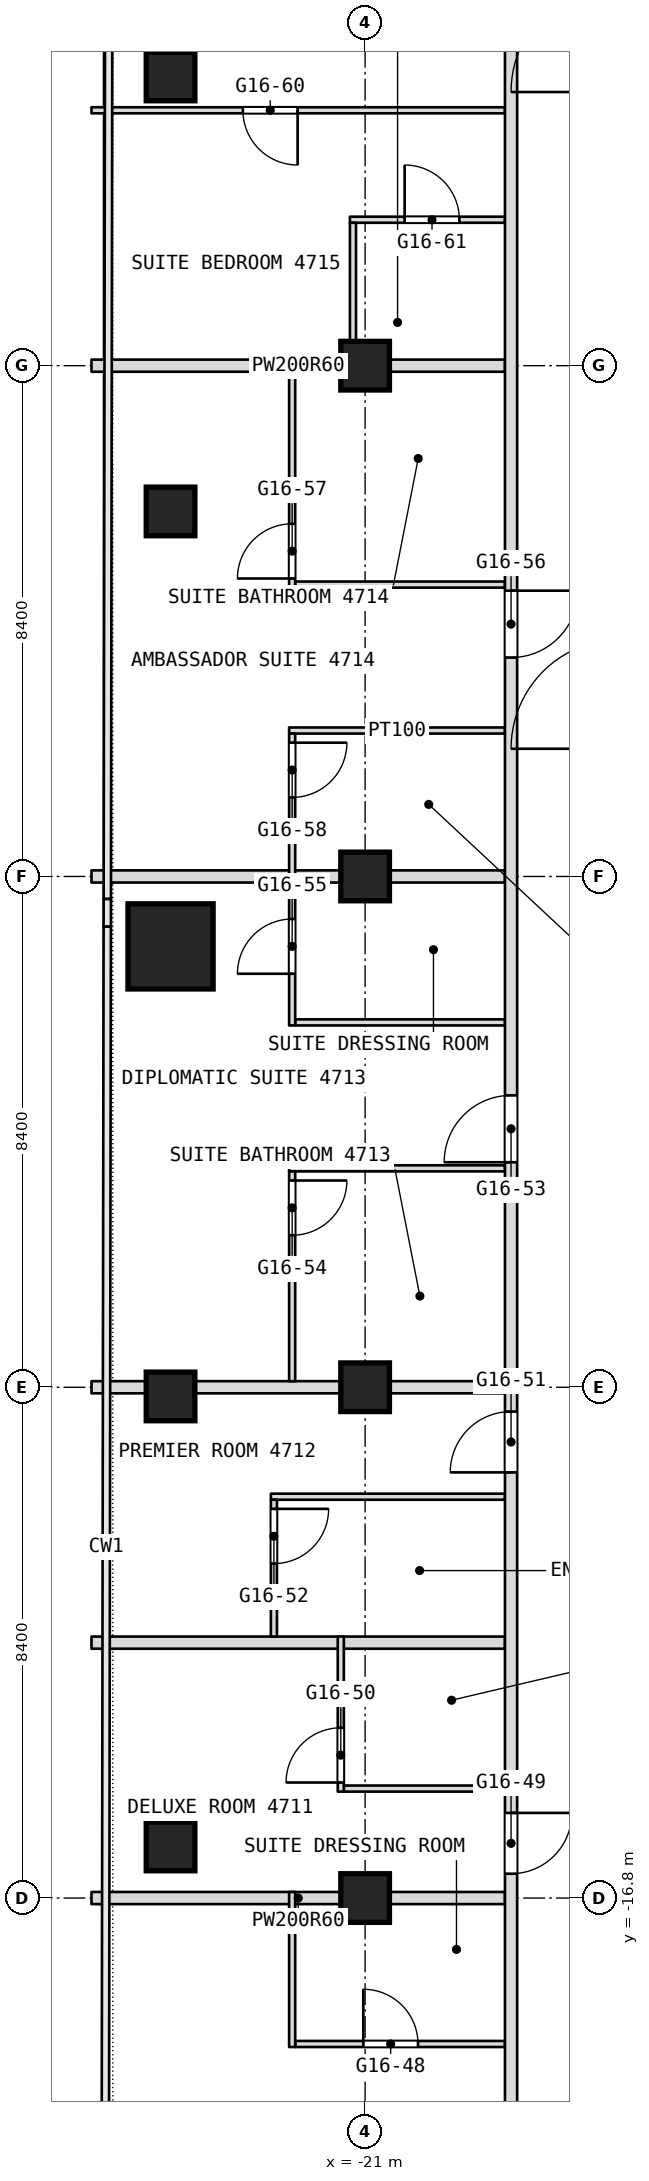
"""IFC4 building model, lengths in metres.
Left out: names, types, materials, properties, quantities, classifications, styles, units other than length and angle.
Written with IfcOpenShell. Run it as: python <this file> out.ifc"""

import sys

from ifc_helpers import new_model, si_unit, direction, frame, frame_2d, origin, origin_2d, place, context, subcontext, project, spatial, rectangle, extrude, element, fill, save


model = new_model("IFC4")
c1 = context("Model", 3, precision=1e-05, world=origin(), true_north=direction((0.0, 1.0)))
c2 = subcontext(c1, "Body", "Model", "MODEL_VIEW")
j1 = project(units=[si_unit("LENGTHUNIT", "METRE"), si_unit("PLANEANGLEUNIT", "RADIAN")], contexts=[c1])
p1 = place(None, origin())
s1 = spatial("IfcSite", under=j1, at=p1, CompositionType="ELEMENT")
p2 = place(p1, origin())
s2 = spatial("IfcBuilding", under=s1, at=p2, CompositionType="ELEMENT")
p3 = place(p2, frame((0.0, 0.0, 205.7)))
s3 = spatial("IfcBuildingStorey", under=s2, at=p3, CompositionType="ELEMENT", Elevation=205.7)
p4 = place(p3, frame((-24.2, -1.15, 0.0), z_axis=(0.0, 0.0, 1.0), x_axis=(1.0, 0.0, 0.0)))
e1 = element("IfcColumn", 1, at=p4, inside=s3, PredefinedType="COLUMN", context=c2, shape_type="SweptSolid", body=[
    extrude(rectangle(XDim=1.4, YDim=1.4, at=origin_2d()), origin(), (0.0, 0.0, 1.0), 3.6),
])
for number, where, z_axis, x_axis in (
    (2, (-21.0, -16.8, 0.0), (0.0, 0.0, 1.0), (1.0, 0.0, 0.0)),
    (3, (-21.0, -8.4, 0.0), (0.0, 0.0, 1.0), (1.0, 0.0, 0.0)),
    (4, (-21.0, 0.0, 0.0), (0.0, 0.0, 1.0), (1.0, 0.0, 0.0)),
    (5, (-21.0, 8.4, 0.0), (0.0, 0.0, 1.0), (1.0, 0.0, 0.0)),
    (6, (-24.2, -15.952, 0.0), (0.0, 0.0, 1.0), (1.0, 0.0, 0.0)),
    (7, (-24.2, -8.551, 0.0), (0.0, 0.0, 1.0), (1.0, 0.0, 0.0)),
    (8, (-24.2, 6.003, 0.0), (0.0, 0.0, 1.0), (1.0, 0.0, 0.0)),
    (9, (-24.2, 13.156, 0.0), (0.0, 0.0, 1.0), (1.0, 0.0, 0.0)),
):
    element("IfcColumn", number, at=place(p3, frame(where, z_axis=z_axis, x_axis=x_axis)), inside=s3, PredefinedType="COLUMN", context=c2, shape_type="SweptSolid", body=[
        extrude(rectangle(XDim=0.8, YDim=0.8, at=origin_2d()), origin(), (0.0, 0.0, 1.0), 3.6),
    ])
p5 = place(p3, frame((-22.15, -19.2, 0.0), z_axis=(0.0, 0.0, 1.0), x_axis=(1.0, 0.0, 0.0)))
e10 = element("IfcWall", 10, at=p5, inside=s3, PredefinedType="PARTITIONING", context=c2, shape_type="SweptSolid", body=[
    extrude(rectangle(XDim=3.45, YDim=0.1, at=frame_2d((1.725, 0.0))), origin(), (0.0, 0.0, 1.0), 3.34),
])
p6 = place(p5, frame((1.12, 0.0, 0.0)))
e11 = element("IfcOpeningElement", 11, at=p6, cuts=e10, PredefinedType="OPENING", context=c2, shape_type="SweptSolid", body=[
    extrude(rectangle(XDim=0.9, YDim=2.1, at=frame_2d((0.45, 1.05))), frame((0.0, 0.05, 0.0), z_axis=(0.0, -1.0, 0.0), x_axis=(1.0, 0.0, 0.0)), (0.0, 0.0, 1.0), 0.1),
])
p7 = place(p3, frame((-25.5, -16.8, 0.0), z_axis=(0.0, 0.0, 1.0), x_axis=(1.0, 0.0, 0.0)))
e12 = element("IfcWall", 12, at=p7, inside=s3, PredefinedType="PARTITIONING", context=c2, shape_type="SweptSolid", body=[
    extrude(rectangle(XDim=6.8, YDim=0.2, at=frame_2d((3.4, 0.0))), origin(), (0.0, 0.0, 1.0), 2.94),
])
p8 = place(p3, frame((-21.35, -15.0, 0.0), z_axis=(0.0, 0.0, 1.0), x_axis=(1.0, 0.0, 0.0)))
e13 = element("IfcWall", 13, at=p8, inside=s3, PredefinedType="PARTITIONING", context=c2, shape_type="SweptSolid", body=[
    extrude(rectangle(XDim=2.65, YDim=0.1, at=frame_2d((1.325, 0.0))), origin(), (0.0, 0.0, 1.0), 3.34),
])
p9 = place(p3, frame((-25.5, -12.6, 0.0), z_axis=(0.0, 0.0, 1.0), x_axis=(1.0, 0.0, 0.0)))
e14 = element("IfcWall", 14, at=p9, inside=s3, PredefinedType="PARTITIONING", context=c2, shape_type="SweptSolid", body=[
    extrude(rectangle(XDim=6.8, YDim=0.2, at=frame_2d((3.4, 0.0))), origin(), (0.0, 0.0, 1.0), 3.34),
])
p10 = place(p3, frame((-22.55, -10.2, 0.0), z_axis=(0.0, 0.0, 1.0), x_axis=(1.0, 0.0, 0.0)))
e15 = element("IfcWall", 15, at=p10, inside=s3, PredefinedType="PARTITIONING", context=c2, shape_type="SweptSolid", body=[
    extrude(rectangle(XDim=3.85, YDim=0.1, at=frame_2d((1.925, 0.0))), origin(), (0.0, 0.0, 1.0), 3.34),
])
p11 = place(p3, frame((-25.5, -8.4, 0.0), z_axis=(0.0, 0.0, 1.0), x_axis=(1.0, 0.0, 0.0)))
e16 = element("IfcWall", 16, at=p11, inside=s3, PredefinedType="PARTITIONING", context=c2, shape_type="SweptSolid", body=[
    extrude(rectangle(XDim=6.8, YDim=0.2, at=frame_2d((3.4, 0.0))), origin(), (0.0, 0.0, 1.0), 2.94),
])
p12 = place(p3, frame((-22.25, -4.8, 0.0), z_axis=(0.0, 0.0, 1.0), x_axis=(1.0, 0.0, 0.0)))
e17 = element("IfcWall", 17, at=p12, inside=s3, PredefinedType="PARTITIONING", context=c2, shape_type="SweptSolid", body=[
    extrude(rectangle(XDim=3.55, YDim=0.1, at=frame_2d((1.775, 0.0))), origin(), (0.0, 0.0, 1.0), 3.34),
])
p13 = place(p3, frame((-22.15, -2.4, 0.0), z_axis=(0.0, 0.0, 1.0), x_axis=(1.0, 0.0, 0.0)))
e18 = element("IfcWall", 18, at=p13, inside=s3, PredefinedType="PARTITIONING", context=c2, shape_type="SweptSolid", body=[
    extrude(rectangle(XDim=3.45, YDim=0.1, at=frame_2d((1.725, 0.0))), origin(), (0.0, 0.0, 1.0), 3.34),
])
p14 = place(p3, frame((-25.5, 0.0, 0.0), z_axis=(0.0, 0.0, 1.0), x_axis=(1.0, 0.0, 0.0)))
e19 = element("IfcWall", 19, at=p14, inside=s3, PredefinedType="PARTITIONING", context=c2, shape_type="SweptSolid", body=[
    extrude(rectangle(XDim=6.8, YDim=0.2, at=frame_2d((3.4, 0.0))), origin(), (0.0, 0.0, 1.0), 2.94),
])
p15 = place(p3, frame((-22.25, 2.4, 0.0), z_axis=(0.0, 0.0, 1.0), x_axis=(1.0, 0.0, 0.0)))
e20 = element("IfcWall", 20, at=p15, inside=s3, PredefinedType="PARTITIONING", context=c2, shape_type="SweptSolid", body=[
    extrude(rectangle(XDim=3.55, YDim=0.1, at=frame_2d((1.775, 0.0))), origin(), (0.0, 0.0, 1.0), 3.34),
])
p16 = place(p3, frame((-22.15, 4.8, 0.0), z_axis=(0.0, 0.0, 1.0), x_axis=(1.0, 0.0, 0.0)))
e21 = element("IfcWall", 21, at=p16, inside=s3, PredefinedType="PARTITIONING", context=c2, shape_type="SweptSolid", body=[
    extrude(rectangle(XDim=3.45, YDim=0.1, at=frame_2d((1.725, 0.0))), origin(), (0.0, 0.0, 1.0), 3.34),
])
p17 = place(p3, frame((-25.5, 8.4, 0.0), z_axis=(0.0, 0.0, 1.0), x_axis=(1.0, 0.0, 0.0)))
e22 = element("IfcWall", 22, at=p17, inside=s3, PredefinedType="PARTITIONING", context=c2, shape_type="SweptSolid", body=[
    extrude(rectangle(XDim=6.8, YDim=0.2, at=frame_2d((3.4, 0.0))), origin(), (0.0, 0.0, 1.0), 2.94),
])
p18 = place(p3, frame((-21.25, 10.8, 0.0), z_axis=(0.0, 0.0, 1.0), x_axis=(1.0, 0.0, 0.0)))
e23 = element("IfcWall", 23, at=p18, inside=s3, PredefinedType="PARTITIONING", context=c2, shape_type="SweptSolid", body=[
    extrude(rectangle(XDim=2.55, YDim=0.1, at=frame_2d((1.275, 0.0))), origin(), (0.0, 0.0, 1.0), 3.34),
])
p19 = place(p18, frame((0.9, 0.0, 0.0)))
e24 = element("IfcOpeningElement", 24, at=p19, cuts=e23, PredefinedType="OPENING", context=c2, shape_type="SweptSolid", body=[
    extrude(rectangle(XDim=0.9, YDim=2.1, at=frame_2d((0.45, 1.05))), frame((0.0, 0.05, 0.0), z_axis=(0.0, -1.0, 0.0), x_axis=(1.0, 0.0, 0.0)), (0.0, 0.0, 1.0), 0.1),
])
p20 = place(p3, frame((-25.5, 12.6, 0.0), z_axis=(0.0, 0.0, 1.0), x_axis=(1.0, 0.0, 0.0)))
e25 = element("IfcWall", 25, at=p20, inside=s3, PredefinedType="PARTITIONING", context=c2, shape_type="SweptSolid", body=[
    extrude(rectangle(XDim=6.8, YDim=0.1, at=frame_2d((3.4, 0.0))), origin(), (0.0, 0.0, 1.0), 3.34),
])
p21 = place(p20, frame((2.49, 0.0, 0.0)))
e26 = element("IfcOpeningElement", 26, at=p21, cuts=e25, PredefinedType="OPENING", context=c2, shape_type="SweptSolid", body=[
    extrude(rectangle(XDim=0.9, YDim=2.1, at=frame_2d((0.45, 1.05))), frame((0.0, 0.05, 0.0), z_axis=(0.0, -1.0, 0.0), x_axis=(1.0, 0.0, 0.0)), (0.0, 0.0, 1.0), 0.1),
])
p22 = place(p3, frame((-18.6, -26.751, 0.0), z_axis=(0.0, 0.0, 1.0), x_axis=(0.0, 1.0, 0.0)))
e27 = element("IfcWall", 27, at=p22, inside=s3, PredefinedType="PARTITIONING", context=c2, shape_type="SweptSolid", body=[
    extrude(rectangle(XDim=49.091, YDim=0.2, at=frame_2d((24.545, 0.0))), origin(), (0.0, 0.0, 1.0), 3.34),
])
p23 = place(p22, frame((4.576, 0.0, 0.0)))
e28 = element("IfcOpeningElement", 28, at=p23, cuts=e27, PredefinedType="OPENING", context=c2, shape_type="SweptSolid", body=[
    extrude(rectangle(XDim=1.1, YDim=2.1, at=frame_2d((0.55, 1.05))), frame((0.0, 0.1, 0.0), z_axis=(0.0, -1.0, 0.0), x_axis=(1.0, 0.0, 0.0)), (0.0, 0.0, 1.0), 0.2),
])
p24 = place(p22, frame((10.351, 0.0, 0.0)))
e29 = element("IfcOpeningElement", 29, at=p24, cuts=e27, PredefinedType="OPENING", context=c2, shape_type="SweptSolid", body=[
    extrude(rectangle(XDim=1.0, YDim=2.1, at=frame_2d((0.5, 1.05))), frame((0.0, 0.1, 0.0), z_axis=(0.0, -1.0, 0.0), x_axis=(1.0, 0.0, 0.0)), (0.0, 0.0, 1.0), 0.2),
])
p25 = place(p22, frame((16.951, 0.0, 0.0)))
e30 = element("IfcOpeningElement", 30, at=p25, cuts=e27, PredefinedType="OPENING", context=c2, shape_type="SweptSolid", body=[
    extrude(rectangle(XDim=1.0, YDim=2.1, at=frame_2d((0.5, 1.05))), frame((0.0, 0.1, 0.0), z_axis=(0.0, -1.0, 0.0), x_axis=(1.0, 0.0, 0.0)), (0.0, 0.0, 1.0), 0.2),
])
p26 = place(p22, frame((22.051, 0.0, 0.0)))
e31 = element("IfcOpeningElement", 31, at=p26, cuts=e27, PredefinedType="OPENING", context=c2, shape_type="SweptSolid", body=[
    extrude(rectangle(XDim=1.1, YDim=2.1, at=frame_2d((0.55, 1.05))), frame((0.0, 0.1, 0.0), z_axis=(0.0, -1.0, 0.0), x_axis=(1.0, 0.0, 0.0)), (0.0, 0.0, 1.0), 0.2),
])
p27 = place(p22, frame((30.351, 0.0, 0.0)))
e32 = element("IfcOpeningElement", 32, at=p27, cuts=e27, PredefinedType="OPENING", context=c2, shape_type="SweptSolid", body=[
    extrude(rectangle(XDim=1.1, YDim=2.1, at=frame_2d((0.55, 1.05))), frame((0.0, 0.1, 0.0), z_axis=(0.0, -1.0, 0.0), x_axis=(1.0, 0.0, 0.0)), (0.0, 0.0, 1.0), 0.2),
])
p28 = place(p22, frame((40.901, 0.0, 0.0)))
e33 = element("IfcOpeningElement", 33, at=p28, cuts=e27, PredefinedType="OPENING", context=c2, shape_type="SweptSolid", body=[
    extrude(rectangle(XDim=1.1, YDim=2.1, at=frame_2d((0.55, 1.05))), frame((0.0, 0.1, 0.0), z_axis=(0.0, -1.0, 0.0), x_axis=(1.0, 0.0, 0.0)), (0.0, 0.0, 1.0), 0.2),
])
p29 = place(p22, frame((44.051, 0.0, 0.0)))
e34 = element("IfcOpeningElement", 34, at=p29, cuts=e27, PredefinedType="OPENING", context=c2, shape_type="SweptSolid", body=[
    extrude(rectangle(XDim=1.0, YDim=2.1, at=frame_2d((0.5, 1.05))), frame((0.0, 0.1, 0.0), z_axis=(0.0, -1.0, 0.0), x_axis=(1.0, 0.0, 0.0)), (0.0, 0.0, 1.0), 0.2),
])
p30 = place(p3, frame((-21.2, 8.5, 0.0), z_axis=(0.0, 0.0, 1.0), x_axis=(0.0, 1.0, 0.0)))
e35 = element("IfcWall", 35, at=p30, inside=s3, PredefinedType="PARTITIONING", context=c2, shape_type="SweptSolid", body=[
    extrude(rectangle(XDim=2.25, YDim=0.1, at=frame_2d((1.125, 0.0))), origin(), (0.0, 0.0, 1.0), 3.34),
])
p31 = place(p3, frame((-21.4, -15.05, 0.0), z_axis=(0.0, 0.0, 1.0), x_axis=(0.0, 1.0, 0.0)))
e36 = element("IfcWall", 36, at=p31, inside=s3, PredefinedType="PARTITIONING", context=c2, shape_type="SweptSolid", body=[
    extrude(rectangle(XDim=2.55, YDim=0.1, at=frame_2d((1.275, 0.0))), origin(), (0.0, 0.0, 1.0), 3.34),
])
p32 = place(p31, frame((0.15, 0.0, 0.0)))
e37 = element("IfcOpeningElement", 37, at=p32, cuts=e36, PredefinedType="OPENING", context=c2, shape_type="SweptSolid", body=[
    extrude(rectangle(XDim=0.9, YDim=2.1, at=frame_2d((0.45, 1.05))), frame((0.0, 0.05, 0.0), z_axis=(0.0, -1.0, 0.0), x_axis=(1.0, 0.0, 0.0)), (0.0, 0.0, 1.0), 0.1),
])
p33 = place(p3, frame((-22.2, -19.25, 0.0), z_axis=(0.0, 0.0, 1.0), x_axis=(0.0, 1.0, 0.0)))
e38 = element("IfcWall", 38, at=p33, inside=s3, PredefinedType="PARTITIONING", context=c2, shape_type="SweptSolid", body=[
    extrude(rectangle(XDim=2.55, YDim=0.1, at=frame_2d((1.275, 0.0))), origin(), (0.0, 0.0, 1.0), 3.34),
])
p34 = place(p3, frame((-22.2, -8.3, 0.0), z_axis=(0.0, 0.0, 1.0), x_axis=(0.0, 1.0, 0.0)))
e39 = element("IfcWall", 39, at=p34, inside=s3, PredefinedType="PARTITIONING", context=c2, shape_type="SweptSolid", body=[
    extrude(rectangle(XDim=3.45, YDim=0.1, at=frame_2d((1.725, 0.0))), origin(), (0.0, 0.0, 1.0), 3.34),
])
p35 = place(p34, frame((2.4, 0.0, 0.0)))
e40 = element("IfcOpeningElement", 40, at=p35, cuts=e39, PredefinedType="OPENING", context=c2, shape_type="SweptSolid", body=[
    extrude(rectangle(XDim=0.9, YDim=2.1, at=frame_2d((0.45, 1.05))), frame((0.0, 0.05, 0.0), z_axis=(0.0, -1.0, 0.0), x_axis=(1.0, 0.0, 0.0)), (0.0, 0.0, 1.0), 0.1),
])
p36 = place(p3, frame((-22.2, -2.45, 0.0), z_axis=(0.0, 0.0, 1.0), x_axis=(0.0, 1.0, 0.0)))
e41 = element("IfcWall", 41, at=p36, inside=s3, PredefinedType="PARTITIONING", context=c2, shape_type="SweptSolid", body=[
    extrude(rectangle(XDim=4.8, YDim=0.1, at=frame_2d((2.4, 0.0))), origin(), (0.0, 0.0, 1.0), 3.34),
])
p37 = place(p36, frame((0.85, 0.0, 0.0)))
e42 = element("IfcOpeningElement", 42, at=p37, cuts=e41, PredefinedType="OPENING", context=c2, shape_type="SweptSolid", body=[
    extrude(rectangle(XDim=0.9, YDim=2.1, at=frame_2d((0.45, 1.05))), frame((0.0, 0.05, 0.0), z_axis=(0.0, -1.0, 0.0), x_axis=(1.0, 0.0, 0.0)), (0.0, 0.0, 1.0), 0.1),
])
p38 = place(p36, frame((3.75, 0.0, 0.0)))
e43 = element("IfcOpeningElement", 43, at=p38, cuts=e41, PredefinedType="OPENING", context=c2, shape_type="SweptSolid", body=[
    extrude(rectangle(XDim=0.9, YDim=2.1, at=frame_2d((0.45, 1.05))), frame((0.0, 0.05, 0.0), z_axis=(0.0, -1.0, 0.0), x_axis=(1.0, 0.0, 0.0)), (0.0, 0.0, 1.0), 0.1),
])
p39 = place(p3, frame((-22.2, 4.75, 0.0), z_axis=(0.0, 0.0, 1.0), x_axis=(0.0, 1.0, 0.0)))
e44 = element("IfcWall", 44, at=p39, inside=s3, PredefinedType="PARTITIONING", context=c2, shape_type="SweptSolid", body=[
    extrude(rectangle(XDim=3.75, YDim=0.1, at=frame_2d((1.875, 0.0))), origin(), (0.0, 0.0, 1.0), 3.34),
])
p40 = place(p39, frame((0.15, 0.0, 0.0)))
e45 = element("IfcOpeningElement", 45, at=p40, cuts=e44, PredefinedType="OPENING", context=c2, shape_type="SweptSolid", body=[
    extrude(rectangle(XDim=0.9, YDim=2.1, at=frame_2d((0.45, 1.05))), frame((0.0, 0.05, 0.0), z_axis=(0.0, -1.0, 0.0), x_axis=(1.0, 0.0, 0.0)), (0.0, 0.0, 1.0), 0.1),
])
p41 = place(p3, frame((-22.5, -12.5, 0.0), z_axis=(0.0, 0.0, 1.0), x_axis=(0.0, 1.0, 0.0)))
e46 = element("IfcWall", 46, at=p41, inside=s3, PredefinedType="PARTITIONING", context=c2, shape_type="SweptSolid", body=[
    extrude(rectangle(XDim=2.25, YDim=0.1, at=frame_2d((1.125, 0.0))), origin(), (0.0, 0.0, 1.0), 3.34),
])
p42 = place(p41, frame((1.2, 0.0, 0.0)))
e47 = element("IfcOpeningElement", 47, at=p42, cuts=e46, PredefinedType="OPENING", context=c2, shape_type="SweptSolid", body=[
    extrude(rectangle(XDim=0.9, YDim=2.1, at=frame_2d((0.45, 1.05))), frame((0.0, 0.05, 0.0), z_axis=(0.0, -1.0, 0.0), x_axis=(1.0, 0.0, 0.0)), (0.0, 0.0, 1.0), 0.1),
])
p43 = place(p6, origin())
e48 = element("IfcDoor", 48, at=p43, inside=s3, OperationType="SINGLE_SWING_LEFT", PredefinedType="DOOR", context=c2, shape_type="SweptSolid", body=[
    extrude(rectangle(XDim=0.9, YDim=2.1, at=frame_2d((0.45, 1.05))), frame((0.0, 0.025, 0.0), z_axis=(0.0, -1.0, 0.0), x_axis=(1.0, 0.0, 0.0)), (0.0, 0.0, 1.0), 0.05),
])
fill(e11, e48)
p44 = place(p19, origin())
e49 = element("IfcDoor", 49, at=p44, inside=s3, OperationType="SINGLE_SWING_LEFT", PredefinedType="DOOR", context=c2, shape_type="SweptSolid", body=[
    extrude(rectangle(XDim=0.9, YDim=2.1, at=frame_2d((0.45, 1.05))), frame((0.0, 0.025, 0.0), z_axis=(0.0, -1.0, 0.0), x_axis=(1.0, 0.0, 0.0)), (0.0, 0.0, 1.0), 0.05),
])
fill(e24, e49)
p45 = place(p21, origin())
e50 = element("IfcDoor", 50, at=p45, inside=s3, OperationType="SINGLE_SWING_RIGHT", PredefinedType="DOOR", context=c2, shape_type="SweptSolid", body=[
    extrude(rectangle(XDim=0.9, YDim=2.1, at=frame_2d((0.45, 1.05))), frame((0.0, 0.025, 0.0), z_axis=(0.0, -1.0, 0.0), x_axis=(1.0, 0.0, 0.0)), (0.0, 0.0, 1.0), 0.05),
])
fill(e26, e50)
p46 = place(p24, origin())
e51 = element("IfcDoor", 51, at=p46, inside=s3, OperationType="SINGLE_SWING_RIGHT", PredefinedType="DOOR", context=c2, shape_type="SweptSolid", body=[
    extrude(rectangle(XDim=1.0, YDim=2.1, at=frame_2d((0.5, 1.05))), frame((0.0, 0.025, 0.0), z_axis=(0.0, -1.0, 0.0), x_axis=(1.0, 0.0, 0.0)), (0.0, 0.0, 1.0), 0.05),
])
fill(e29, e51)
p47 = place(p25, origin())
e52 = element("IfcDoor", 52, at=p47, inside=s3, OperationType="SINGLE_SWING_RIGHT", PredefinedType="DOOR", context=c2, shape_type="SweptSolid", body=[
    extrude(rectangle(XDim=1.0, YDim=2.1, at=frame_2d((0.5, 1.05))), frame((0.0, 0.025, 0.0), z_axis=(0.0, -1.0, 0.0), x_axis=(1.0, 0.0, 0.0)), (0.0, 0.0, 1.0), 0.05),
])
fill(e30, e52)
p48 = place(p26, origin())
e53 = element("IfcDoor", 53, at=p48, inside=s3, OperationType="SINGLE_SWING_LEFT", PredefinedType="DOOR", context=c2, shape_type="SweptSolid", body=[
    extrude(rectangle(XDim=1.1, YDim=2.1, at=frame_2d((0.55, 1.05))), frame((0.0, 0.025, 0.0), z_axis=(0.0, -1.0, 0.0), x_axis=(1.0, 0.0, 0.0)), (0.0, 0.0, 1.0), 0.05),
])
fill(e31, e53)
p49 = place(p27, origin())
e54 = element("IfcDoor", 54, at=p49, inside=s3, OperationType="SINGLE_SWING_RIGHT", PredefinedType="DOOR", context=c2, shape_type="SweptSolid", body=[
    extrude(rectangle(XDim=1.1, YDim=2.1, at=frame_2d((0.55, 1.05))), frame((0.0, 0.025, 0.0), z_axis=(0.0, -1.0, 0.0), x_axis=(1.0, 0.0, 0.0)), (0.0, 0.0, 1.0), 0.05),
])
fill(e32, e54)
p50 = place(p32, origin())
e55 = element("IfcDoor", 55, at=p50, inside=s3, OperationType="SINGLE_SWING_RIGHT", PredefinedType="DOOR", context=c2, shape_type="SweptSolid", body=[
    extrude(rectangle(XDim=0.9, YDim=2.1, at=frame_2d((0.45, 1.05))), frame((0.0, 0.025, 0.0), z_axis=(0.0, -1.0, 0.0), x_axis=(1.0, 0.0, 0.0)), (0.0, 0.0, 1.0), 0.05),
])
fill(e37, e55)
p51 = place(p35, origin())
e56 = element("IfcDoor", 56, at=p51, inside=s3, OperationType="SINGLE_SWING_LEFT", PredefinedType="DOOR", context=c2, shape_type="SweptSolid", body=[
    extrude(rectangle(XDim=0.9, YDim=2.1, at=frame_2d((0.45, 1.05))), frame((0.0, 0.025, 0.0), z_axis=(0.0, -1.0, 0.0), x_axis=(1.0, 0.0, 0.0)), (0.0, 0.0, 1.0), 0.05),
])
fill(e40, e56)
p52 = place(p37, origin())
e57 = element("IfcDoor", 57, at=p52, inside=s3, OperationType="SINGLE_SWING_LEFT", PredefinedType="DOOR", context=c2, shape_type="SweptSolid", body=[
    extrude(rectangle(XDim=0.9, YDim=2.1, at=frame_2d((0.45, 1.05))), frame((0.0, 0.025, 0.0), z_axis=(0.0, -1.0, 0.0), x_axis=(1.0, 0.0, 0.0)), (0.0, 0.0, 1.0), 0.05),
])
fill(e42, e57)
p53 = place(p38, origin())
e58 = element("IfcDoor", 58, at=p53, inside=s3, OperationType="SINGLE_SWING_LEFT", PredefinedType="DOOR", context=c2, shape_type="SweptSolid", body=[
    extrude(rectangle(XDim=0.9, YDim=2.1, at=frame_2d((0.45, 1.05))), frame((0.0, 0.025, 0.0), z_axis=(0.0, -1.0, 0.0), x_axis=(1.0, 0.0, 0.0)), (0.0, 0.0, 1.0), 0.05),
])
fill(e43, e58)
p54 = place(p40, origin())
e59 = element("IfcDoor", 59, at=p54, inside=s3, OperationType="SINGLE_SWING_RIGHT", PredefinedType="DOOR", context=c2, shape_type="SweptSolid", body=[
    extrude(rectangle(XDim=0.9, YDim=2.1, at=frame_2d((0.45, 1.05))), frame((0.0, 0.025, 0.0), z_axis=(0.0, -1.0, 0.0), x_axis=(1.0, 0.0, 0.0)), (0.0, 0.0, 1.0), 0.05),
])
fill(e45, e59)
p55 = place(p42, origin())
e60 = element("IfcDoor", 60, at=p55, inside=s3, OperationType="SINGLE_SWING_LEFT", PredefinedType="DOOR", context=c2, shape_type="SweptSolid", body=[
    extrude(rectangle(XDim=0.9, YDim=2.1, at=frame_2d((0.45, 1.05))), frame((0.0, 0.025, 0.0), z_axis=(0.0, -1.0, 0.0), x_axis=(1.0, 0.0, 0.0)), (0.0, 0.0, 1.0), 0.05),
])
fill(e47, e60)
save(model, sys.argv[1])
